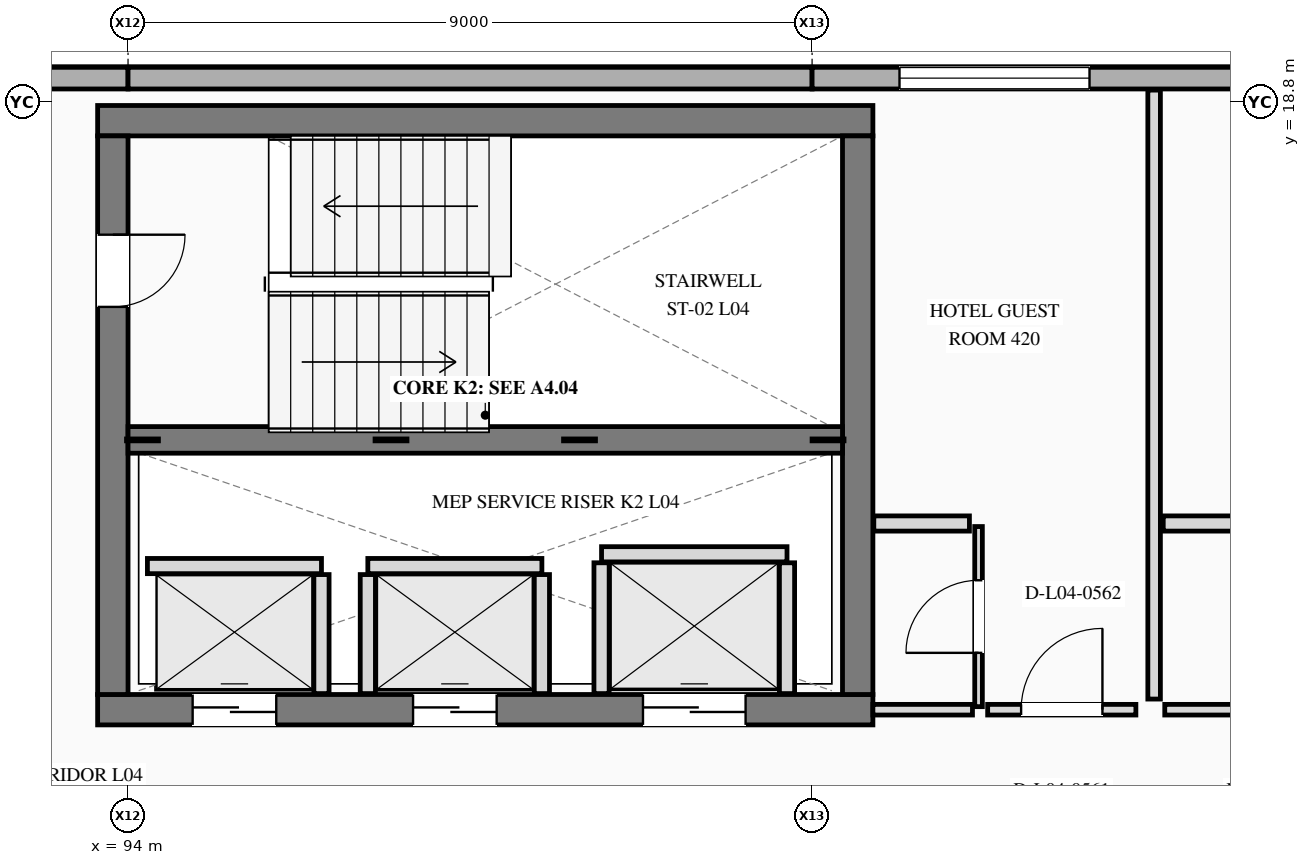
"""IFC4 building model, lengths in metres.
Left out: names, types, materials, properties, quantities, classifications, styles, units other than length and angle.
Written with IfcOpenShell. Run it as: python <this file> out.ifc"""

import sys

from ifc_helpers import new_model, si_unit, direction, frame, frame_2d, origin, place, context, subcontext, project, spatial, rectangle, extrude, element, fill, save


model = new_model("IFC4")
c1 = context("Model", 3, precision=1e-05, world=origin(), true_north=direction((0.0, 1.0)))
c2 = subcontext(c1, "Body", "Model", "MODEL_VIEW")
j1 = project(units=[si_unit("LENGTHUNIT", "METRE"), si_unit("PLANEANGLEUNIT", "RADIAN")], contexts=[c1])
p1 = place(None, origin())
s1 = spatial("IfcSite", under=j1, at=p1, CompositionType="ELEMENT")
p2 = place(p1, origin())
s2 = spatial("IfcBuilding", under=s1, at=p2, CompositionType="ELEMENT")
p3 = place(p2, frame((0.0, 0.0, 19.5)))
s3 = spatial("IfcBuildingStorey", under=s2, at=p3, CompositionType="ELEMENT", Elevation=19.5)
for number, where, z_axis, x_axis in (
    (1, (94.0, 19.11, 0.0), (0.0, 0.0, 1.0), (-1.0, 0.0, 0.0)),
    (2, (103.0, 19.11, 0.0), (0.0, 0.0, 1.0), (-1.0, 0.0, 0.0)),
):
    element("IfcWall", number, at=place(p3, frame(where, z_axis=z_axis, x_axis=x_axis)), inside=s3, PredefinedType="STANDARD", context=c2, shape_type="SweptSolid", body=[
        extrude(rectangle(XDim=9.0, YDim=0.285, at=frame_2d((4.5, 0.0))), origin(), (0.0, 0.0, 1.0), 3.9),
    ])
p4 = place(p3, frame((112.0, 19.11, 0.0), z_axis=(0.0, 0.0, 1.0), x_axis=(-1.0, 0.0, 0.0)))
e3 = element("IfcWall", 3, at=p4, inside=s3, PredefinedType="STANDARD", context=c2, shape_type="SweptSolid", body=[
    extrude(rectangle(XDim=9.0, YDim=0.285, at=frame_2d((4.5, 0.0))), origin(), (0.0, 0.0, 1.0), 3.9),
])
p5 = place(p4, frame((5.35, 0.0, 0.85)))
e4 = element("IfcOpeningElement", 4, at=p5, cuts=e3, PredefinedType="OPENING", context=c2, shape_type="SweptSolid", body=[
    extrude(rectangle(XDim=2.5, YDim=1.75, at=frame_2d((1.25, 0.875))), frame((0.0, 0.152, 0.0), z_axis=(0.0, -1.0, 0.0), x_axis=(1.0, 0.0, 0.0)), (0.0, 0.0, 1.0), 0.305),
])
p6 = place(p4, frame((1.55, 0.0, 0.85)))
e5 = element("IfcOpeningElement", 5, at=p6, cuts=e3, PredefinedType="OPENING", context=c2, shape_type="SweptSolid", body=[
    extrude(rectangle(XDim=1.7, YDim=1.6, at=frame_2d((0.85, 0.8))), frame((0.0, 0.152, 0.0), z_axis=(0.0, -1.0, 0.0), x_axis=(1.0, 0.0, 0.0)), (0.0, 0.0, 1.0), 0.305),
])
p7 = place(p3, frame((93.6, 10.8, 0.0), z_axis=(0.0, 0.0, 1.0), x_axis=(1.0, 0.0, 0.0)))
e6 = element("IfcWall", 6, at=p7, inside=s3, PredefinedType="SHEAR", context=c2, shape_type="SweptSolid", body=[
    extrude(rectangle(XDim=10.2, YDim=0.4, at=frame_2d((5.1, 0.0))), origin(), (0.0, 0.0, 1.0), 3.9),
])
p8 = place(p7, frame((1.25, 0.0, 0.0)))
e7 = element("IfcOpeningElement", 7, at=p8, cuts=e6, PredefinedType="OPENING", context=c2, shape_type="SweptSolid", body=[
    extrude(rectangle(XDim=1.1, YDim=2.2, at=frame_2d((0.55, 1.1))), frame((0.0, 0.21, 0.0), z_axis=(0.0, -1.0, 0.0), x_axis=(1.0, 0.0, 0.0)), (0.0, 0.0, 1.0), 0.42),
])
p9 = place(p7, frame((4.15, 0.0, 0.0)))
e8 = element("IfcOpeningElement", 8, at=p9, cuts=e6, PredefinedType="OPENING", context=c2, shape_type="SweptSolid", body=[
    extrude(rectangle(XDim=1.1, YDim=2.2, at=frame_2d((0.55, 1.1))), frame((0.0, 0.21, 0.0), z_axis=(0.0, -1.0, 0.0), x_axis=(1.0, 0.0, 0.0)), (0.0, 0.0, 1.0), 0.42),
])
p10 = place(p7, frame((7.175, 0.0, 0.0)))
e9 = element("IfcOpeningElement", 9, at=p10, cuts=e6, PredefinedType="OPENING", context=c2, shape_type="SweptSolid", body=[
    extrude(rectangle(XDim=1.35, YDim=2.3, at=frame_2d((0.675, 1.15))), frame((0.0, 0.21, 0.0), z_axis=(0.0, -1.0, 0.0), x_axis=(1.0, 0.0, 0.0)), (0.0, 0.0, 1.0), 0.42),
])
p11 = place(p3, frame((103.8, 18.55, 0.0), z_axis=(0.0, 0.0, 1.0), x_axis=(-1.0, 0.0, 0.0)))
e10 = element("IfcWall", 10, at=p11, inside=s3, PredefinedType="SHEAR", context=c2, shape_type="SweptSolid", body=[
    extrude(rectangle(XDim=10.2, YDim=0.4, at=frame_2d((5.1, 0.0))), origin(), (0.0, 0.0, 1.0), 3.9),
])
p12 = place(p3, frame((93.8, 18.35, 0.0), z_axis=(0.0, 0.0, 1.0), x_axis=(0.0, -1.0, 0.0)))
e11 = element("IfcWall", 11, at=p12, inside=s3, PredefinedType="SHEAR", context=c2, shape_type="SweptSolid", body=[
    extrude(rectangle(XDim=7.35, YDim=0.4, at=frame_2d((3.675, 0.0))), origin(), (0.0, 0.0, 1.0), 3.9),
])
p13 = place(p12, frame((1.3, 0.0, 0.0)))
e12 = element("IfcOpeningElement", 12, at=p13, cuts=e11, PredefinedType="OPENING", context=c2, shape_type="SweptSolid", body=[
    extrude(rectangle(XDim=0.95, YDim=2.2, at=frame_2d((0.475, 1.1))), frame((0.0, 0.21, 0.0), z_axis=(0.0, -1.0, 0.0), x_axis=(1.0, 0.0, 0.0)), (0.0, 0.0, 1.0), 0.42),
])
p14 = place(p3, frame((103.6, 11.0, 0.0), z_axis=(0.0, 0.0, 1.0), x_axis=(0.0, 1.0, 0.0)))
e13 = element("IfcWall", 13, at=p14, inside=s3, PredefinedType="SHEAR", context=c2, shape_type="SweptSolid", body=[
    extrude(rectangle(XDim=7.35, YDim=0.4, at=frame_2d((3.675, 0.0))), origin(), (0.0, 0.0, 1.0), 3.9),
])
p15 = place(p3, frame((94.0, 14.35, 0.0), z_axis=(0.0, 0.0, 1.0), x_axis=(1.0, 0.0, 0.0)))
e14 = element("IfcWall", 14, at=p15, inside=s3, PredefinedType="SHEAR", context=c2, shape_type="SweptSolid", body=[
    extrude(rectangle(XDim=9.4, YDim=0.35, at=frame_2d((4.7, 0.0))), origin(), (0.0, 0.0, 1.0), 3.9),
])
p16 = place(p3, frame((94.255, 12.69, 0.0), z_axis=(0.0, 0.0, 1.0), x_axis=(1.0, 0.0, 0.0)))
e15 = element("IfcWall", 15, at=p16, inside=s3, PredefinedType="PLUMBINGWALL", context=c2, shape_type="SweptSolid", body=[
    extrude(rectangle(XDim=2.29, YDim=0.2, at=frame_2d((1.145, 0.0))), origin(), (0.0, 0.0, 1.0), 3.585),
])
p17 = place(p3, frame((96.545, 11.012, 0.0), z_axis=(0.0, 0.0, 1.0), x_axis=(0.0, 1.0, 0.0)))
e16 = element("IfcWall", 16, at=p17, inside=s3, PredefinedType="PLUMBINGWALL", context=c2, shape_type="SweptSolid", body=[
    extrude(rectangle(XDim=1.566, YDim=0.2, at=frame_2d((0.783, 0.0))), origin(), (0.0, 0.0, 1.0), 3.585),
])
p18 = place(p3, frame((97.155, 12.69, 0.0), z_axis=(0.0, 0.0, 1.0), x_axis=(1.0, 0.0, 0.0)))
e17 = element("IfcWall", 17, at=p18, inside=s3, PredefinedType="PLUMBINGWALL", context=c2, shape_type="SweptSolid", body=[
    extrude(rectangle(XDim=2.29, YDim=0.2, at=frame_2d((1.145, 0.0))), origin(), (0.0, 0.0, 1.0), 3.585),
])
for number, where, z_axis, x_axis in (
    (18, (97.155, 11.012, 0.0), (0.0, 0.0, 1.0), (0.0, 1.0, 0.0)),
    (19, (99.445, 11.012, 0.0), (0.0, 0.0, 1.0), (0.0, 1.0, 0.0)),
):
    element("IfcWall", number, at=place(p3, frame(where, z_axis=z_axis, x_axis=x_axis)), inside=s3, PredefinedType="PLUMBINGWALL", context=c2, shape_type="SweptSolid", body=[
        extrude(rectangle(XDim=1.566, YDim=0.2, at=frame_2d((0.783, 0.0))), origin(), (0.0, 0.0, 1.0), 3.585),
    ])
p19 = place(p3, frame((100.23, 12.845, 0.0), z_axis=(0.0, 0.0, 1.0), x_axis=(1.0, 0.0, 0.0)))
e20 = element("IfcWall", 20, at=p19, inside=s3, PredefinedType="PLUMBINGWALL", context=c2, shape_type="SweptSolid", body=[
    extrude(rectangle(XDim=2.44, YDim=0.2, at=frame_2d((1.22, 0.0))), origin(), (0.0, 0.0, 1.0), 3.585),
])
for number, where, z_axis, x_axis in (
    (21, (100.23, 11.012, 0.0), (0.0, 0.0, 1.0), (0.0, 1.0, 0.0)),
    (22, (102.67, 11.012, 0.0), (0.0, 0.0, 1.0), (0.0, 1.0, 0.0)),
):
    element("IfcWall", number, at=place(p3, frame(where, z_axis=z_axis, x_axis=x_axis)), inside=s3, PredefinedType="PLUMBINGWALL", context=c2, shape_type="SweptSolid", body=[
        extrude(rectangle(XDim=1.721, YDim=0.2, at=frame_2d((0.86, 0.0))), origin(), (0.0, 0.0, 1.0), 3.585),
    ])
p20 = place(p3, frame((103.8, 10.8, 0.0), z_axis=(0.0, 0.0, 1.0), x_axis=(1.0, 0.0, 0.0)))
e23 = element("IfcWall", 23, at=p20, inside=s3, PredefinedType="PARTITIONING", context=c2, shape_type="SweptSolid", body=[
    extrude(rectangle(XDim=1.31, YDim=0.14, at=frame_2d((0.655, 0.0))), origin(), (0.0, 0.0, 1.0), 3.585),
])
p21 = place(p3, frame((105.31, 10.8, 0.0), z_axis=(0.0, 0.0, 1.0), x_axis=(1.0, 0.0, 0.0)))
e24 = element("IfcWall", 24, at=p21, inside=s3, PredefinedType="PARTITIONING", context=c2, shape_type="SweptSolid", body=[
    extrude(rectangle(XDim=1.95, YDim=0.14, at=frame_2d((0.975, 0.0))), origin(), (0.0, 0.0, 1.0), 3.585),
])
p22 = place(p21, frame((0.44, 0.0, 0.0)))
e25 = element("IfcOpeningElement", 25, at=p22, cuts=e24, PredefinedType="OPENING", context=c2, shape_type="SweptSolid", body=[
    extrude(rectangle(XDim=1.07, YDim=2.4, at=frame_2d((0.535, 1.2))), frame((0.0, 0.08, 0.0), z_axis=(0.0, -1.0, 0.0), x_axis=(1.0, 0.0, 0.0)), (0.0, 0.0, 1.0), 0.16),
])
p23 = place(p3, frame((107.5, 10.94, 0.0), z_axis=(0.0, 0.0, 1.0), x_axis=(0.0, 1.0, 0.0)))
e26 = element("IfcWall", 26, at=p23, inside=s3, PredefinedType="PARTITIONING", context=c2, shape_type="SweptSolid", body=[
    extrude(rectangle(XDim=8.012, YDim=0.165, at=frame_2d((4.006, 0.0))), origin(), (0.0, 0.0, 1.0), 3.585),
])
p24 = place(p3, frame((105.19, 10.84, 0.0), z_axis=(0.0, 0.0, 1.0), x_axis=(0.0, 1.0, 0.0)))
e27 = element("IfcWall", 27, at=p24, inside=s3, PredefinedType="PARTITIONING", context=c2, shape_type="SweptSolid", body=[
    extrude(rectangle(XDim=2.37, YDim=0.1, at=frame_2d((1.185, 0.0))), origin(), (0.0, 0.0, 1.0), 3.585),
])
p25 = place(p24, frame((0.708, 0.0, 0.0)))
e28 = element("IfcOpeningElement", 28, at=p25, cuts=e27, PredefinedType="OPENING", context=c2, shape_type="SweptSolid", body=[
    extrude(rectangle(XDim=0.955, YDim=2.22, at=frame_2d((0.478, 1.11))), frame((0.0, 0.06, 0.0), z_axis=(0.0, -1.0, 0.0), x_axis=(1.0, 0.0, 0.0)), (0.0, 0.0, 1.0), 0.12),
])
p26 = place(p3, frame((103.812, 13.25, 0.0), z_axis=(0.0, 0.0, 1.0), x_axis=(1.0, 0.0, 0.0)))
e29 = element("IfcWall", 29, at=p26, inside=s3, PredefinedType="PLUMBINGWALL", context=c2, shape_type="SweptSolid", body=[
    extrude(rectangle(XDim=1.258, YDim=0.2, at=frame_2d((0.629, 0.0))), origin(), (0.0, 0.0, 1.0), 3.585),
])
p27 = place(p3, frame((107.64, 10.8, 0.0), z_axis=(0.0, 0.0, 1.0), x_axis=(1.0, 0.0, 0.0)))
e30 = element("IfcWall", 30, at=p27, inside=s3, PredefinedType="PARTITIONING", context=c2, shape_type="SweptSolid", body=[
    extrude(rectangle(XDim=1.67, YDim=0.14, at=frame_2d((0.835, 0.0))), origin(), (0.0, 0.0, 1.0), 3.585),
])
p28 = place(p3, frame((107.62, 13.25, 0.0), z_axis=(0.0, 0.0, 1.0), x_axis=(1.0, 0.0, 0.0)))
e31 = element("IfcWall", 31, at=p28, inside=s3, PredefinedType="PLUMBINGWALL", context=c2, shape_type="SweptSolid", body=[
    extrude(rectangle(XDim=1.65, YDim=0.2, at=frame_2d((0.825, 0.0))), origin(), (0.0, 0.0, 1.0), 3.585),
])
p29 = place(p5, origin())
e32 = element("IfcWindow", 32, at=p29, inside=s3, PartitioningType="SINGLE_PANEL", PredefinedType="WINDOW", context=c2, shape_type="SweptSolid", body=[
    extrude(rectangle(XDim=2.5, YDim=1.75, at=frame_2d((1.25, 0.875))), frame((0.0, 0.03, 0.0), z_axis=(0.0, -1.0, 0.0), x_axis=(1.0, 0.0, 0.0)), (0.0, 0.0, 1.0), 0.06),
])
fill(e4, e32)
p30 = place(p13, origin())
e33 = element("IfcDoor", 33, at=p30, inside=s3, OperationType="SINGLE_SWING_LEFT", PredefinedType="DOOR", context=c2, shape_type="SweptSolid", body=[
    extrude(rectangle(XDim=0.95, YDim=2.2, at=frame_2d((0.475, 1.1))), frame((0.0, 0.025, 0.0), z_axis=(0.0, -1.0, 0.0), x_axis=(1.0, 0.0, 0.0)), (0.0, 0.0, 1.0), 0.05),
])
fill(e12, e33)
p31 = place(p8, origin())
e34 = element("IfcDoor", 34, at=p31, inside=s3, OperationType="SLIDING_TO_LEFT", PredefinedType="DOOR", context=c2, shape_type="SweptSolid", body=[
    extrude(rectangle(XDim=1.1, YDim=2.2, at=frame_2d((0.55, 1.1))), frame((0.0, 0.025, 0.0), z_axis=(0.0, -1.0, 0.0), x_axis=(1.0, 0.0, 0.0)), (0.0, 0.0, 1.0), 0.05),
])
fill(e7, e34)
p32 = place(p9, origin())
e35 = element("IfcDoor", 35, at=p32, inside=s3, OperationType="SLIDING_TO_RIGHT", PredefinedType="DOOR", context=c2, shape_type="SweptSolid", body=[
    extrude(rectangle(XDim=1.1, YDim=2.2, at=frame_2d((0.55, 1.1))), frame((0.0, 0.025, 0.0), z_axis=(0.0, -1.0, 0.0), x_axis=(1.0, 0.0, 0.0)), (0.0, 0.0, 1.0), 0.05),
])
fill(e8, e35)
p33 = place(p10, origin())
e36 = element("IfcDoor", 36, at=p33, inside=s3, OperationType="SLIDING_TO_LEFT", PredefinedType="DOOR", context=c2, shape_type="SweptSolid", body=[
    extrude(rectangle(XDim=1.35, YDim=2.3, at=frame_2d((0.675, 1.15))), frame((0.0, 0.025, 0.0), z_axis=(0.0, -1.0, 0.0), x_axis=(1.0, 0.0, 0.0)), (0.0, 0.0, 1.0), 0.05),
])
fill(e9, e36)
p34 = place(p22, origin())
e37 = element("IfcDoor", 37, at=p34, inside=s3, OperationType="SINGLE_SWING_RIGHT", PredefinedType="DOOR", context=c2, shape_type="SweptSolid", body=[
    extrude(rectangle(XDim=1.07, YDim=2.4, at=frame_2d((0.535, 1.2))), frame((0.0, 0.025, 0.0), z_axis=(0.0, -1.0, 0.0), x_axis=(1.0, 0.0, 0.0)), (0.0, 0.0, 1.0), 0.05),
])
fill(e25, e37)
p35 = place(p25, origin())
e38 = element("IfcDoor", 38, at=p35, inside=s3, OperationType="SINGLE_SWING_LEFT", PredefinedType="DOOR", context=c2, shape_type="SweptSolid", body=[
    extrude(rectangle(XDim=0.955, YDim=2.22, at=frame_2d((0.478, 1.11))), frame((0.0, 0.025, 0.0), z_axis=(0.0, -1.0, 0.0), x_axis=(1.0, 0.0, 0.0)), (0.0, 0.0, 1.0), 0.05),
])
fill(e28, e38)
save(model, sys.argv[1])
